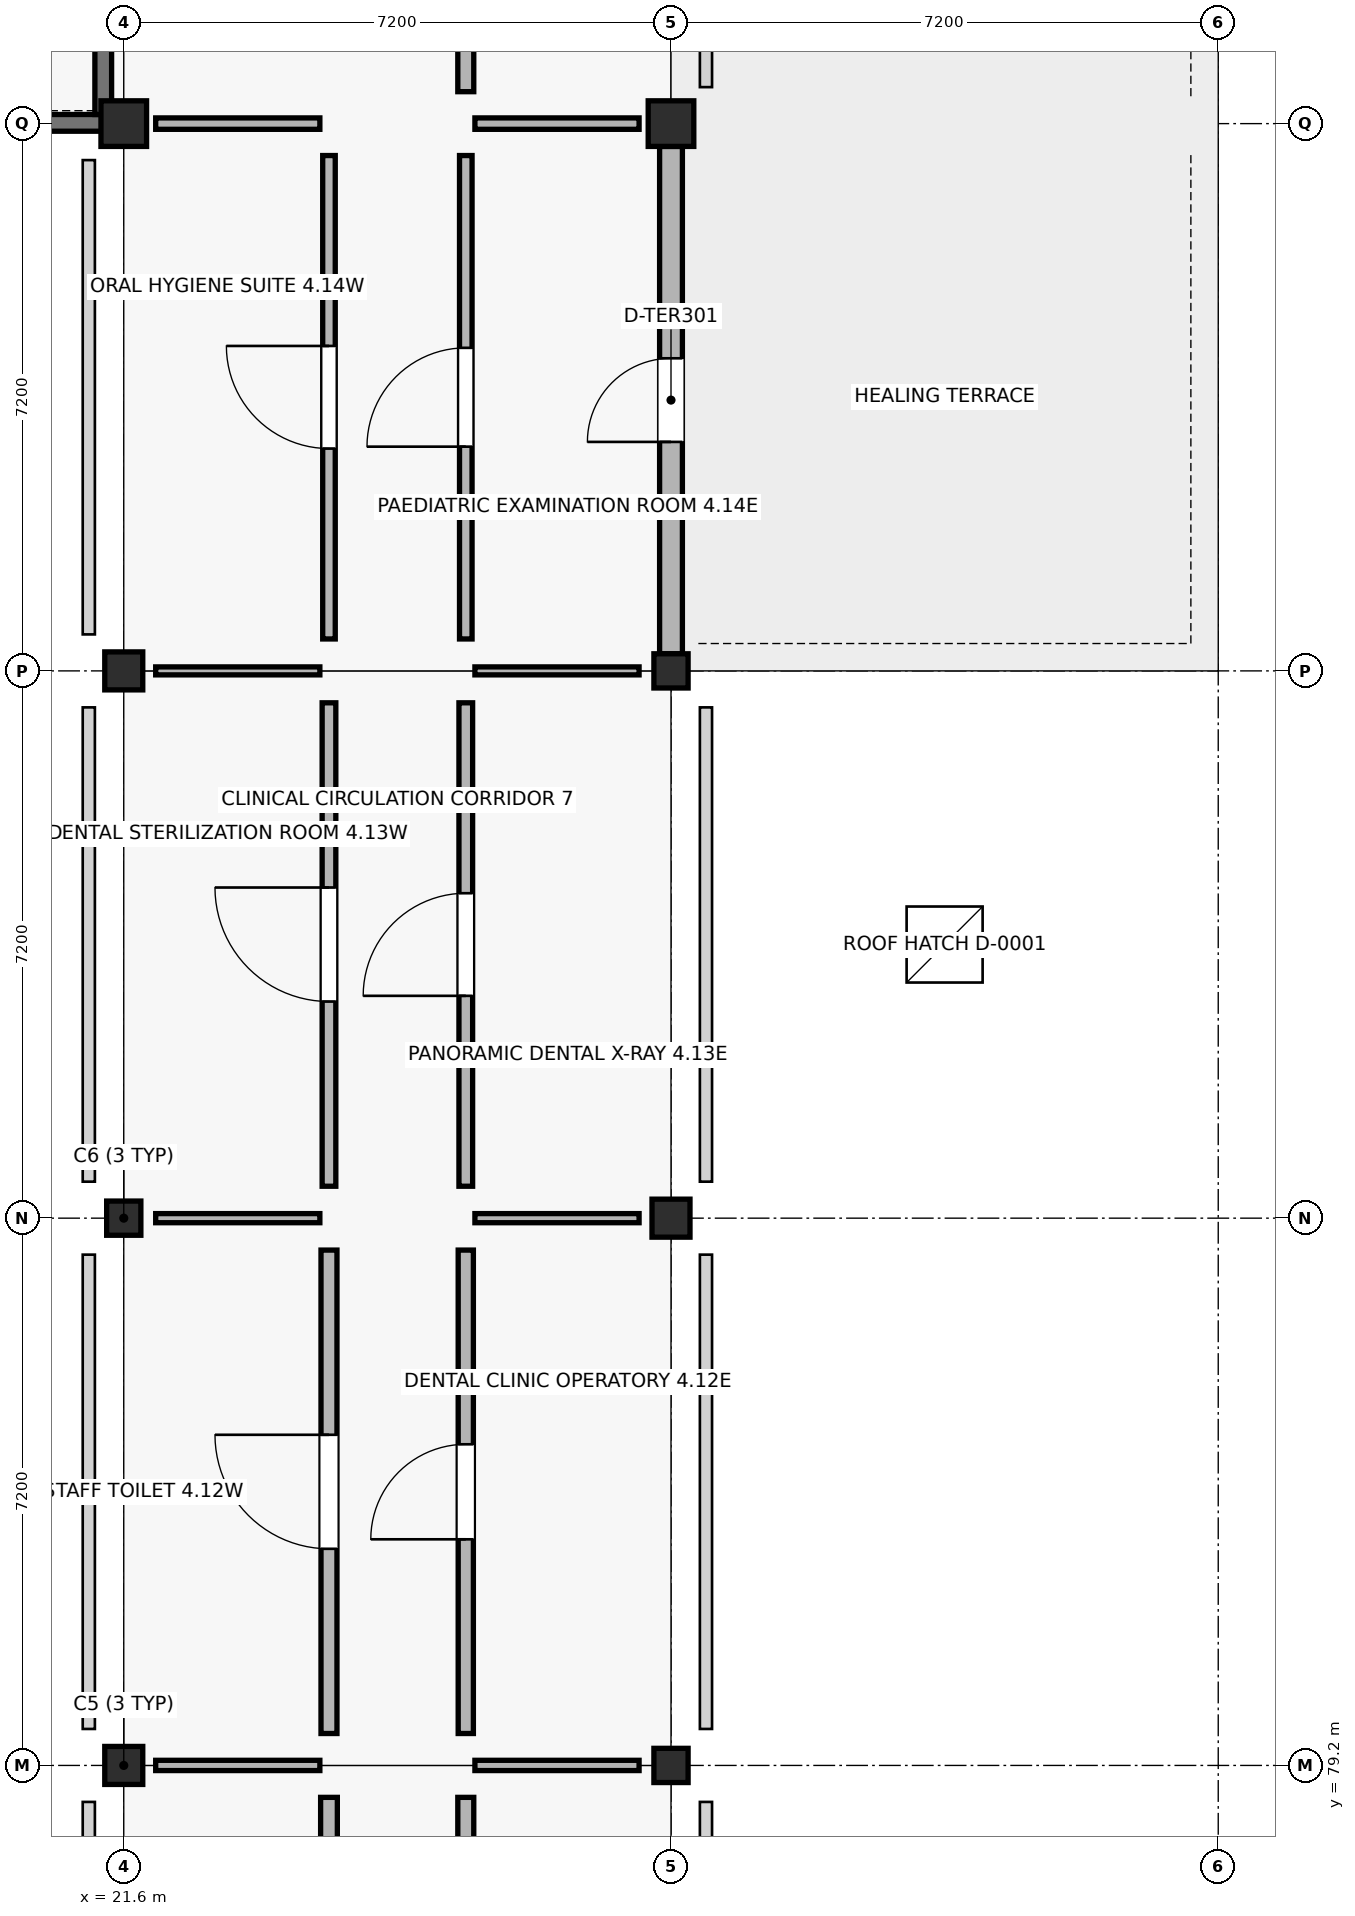
"""IFC4 building model, lengths in metres.
Left out: names, types, materials, properties, quantities, classifications, styles, units other than length and angle.
Written with IfcOpenShell. Run it as: python <this file> out.ifc"""

import sys

from ifc_helpers import new_model, si_unit, direction, frame, frame_2d, origin, origin_2d, place, context, subcontext, project, spatial, rectangle, extrude, element, fill, save


model = new_model("IFC4")
c1 = context("Model", 3, precision=1e-05, world=origin(), true_north=direction((0.0, 1.0)))
c2 = subcontext(c1, "Body", "Model", "MODEL_VIEW")
j1 = project(units=[si_unit("LENGTHUNIT", "METRE"), si_unit("PLANEANGLEUNIT", "RADIAN")], contexts=[c1])
p1 = place(None, origin())
s1 = spatial("IfcSite", under=j1, at=p1, CompositionType="ELEMENT")
p2 = place(p1, origin())
s2 = spatial("IfcBuilding", under=s1, at=p2, CompositionType="ELEMENT")
p3 = place(p2, frame((0.0, 0.0, 13.5)))
s3 = spatial("IfcBuildingStorey", under=s2, at=p3, CompositionType="ELEMENT", Elevation=13.5)
p4 = place(p3, frame((21.6, 79.2, 0.0), z_axis=(0.0, 0.0, 1.0), x_axis=(1.0, 0.0, 0.0)))
e1 = element("IfcColumn", 1, at=p4, inside=s3, PredefinedType="COLUMN", context=c2, shape_type="SweptSolid", body=[
    extrude(rectangle(XDim=0.5, YDim=0.5, at=origin_2d()), origin(), (0.0, 0.0, 1.0), 3.83),
])
p5 = place(p3, frame((21.6, 86.4, 0.0), z_axis=(0.0, 0.0, 1.0), x_axis=(1.0, 0.0, 0.0)))
e2 = element("IfcColumn", 2, at=p5, inside=s3, PredefinedType="COLUMN", context=c2, shape_type="SweptSolid", body=[
    extrude(rectangle(XDim=0.45, YDim=0.45, at=origin_2d()), origin(), (0.0, 0.0, 1.0), 3.83),
])
p6 = place(p3, frame((21.6, 93.6, 0.0), z_axis=(0.0, 0.0, 1.0), x_axis=(1.0, 0.0, 0.0)))
e3 = element("IfcColumn", 3, at=p6, inside=s3, PredefinedType="COLUMN", context=c2, shape_type="SweptSolid", body=[
    extrude(rectangle(XDim=0.5, YDim=0.5, at=origin_2d()), origin(), (0.0, 0.0, 1.0), 3.83),
])
p7 = place(p3, frame((21.6, 100.8, 0.0), z_axis=(0.0, 0.0, 1.0), x_axis=(1.0, 0.0, 0.0)))
e4 = element("IfcColumn", 4, at=p7, inside=s3, PredefinedType="COLUMN", context=c2, shape_type="SweptSolid", body=[
    extrude(rectangle(XDim=0.6, YDim=0.6, at=origin_2d()), origin(), (0.0, 0.0, 1.0), 4.05),
])
p8 = place(p3, frame((28.8, 79.2, 0.0), z_axis=(0.0, 0.0, 1.0), x_axis=(1.0, 0.0, 0.0)))
e5 = element("IfcColumn", 5, at=p8, inside=s3, PredefinedType="COLUMN", context=c2, shape_type="SweptSolid", body=[
    extrude(rectangle(XDim=0.45, YDim=0.45, at=origin_2d()), origin(), (0.0, 0.0, 1.0), 3.83),
])
p9 = place(p3, frame((28.8, 86.4, 0.0), z_axis=(0.0, 0.0, 1.0), x_axis=(1.0, 0.0, 0.0)))
e6 = element("IfcColumn", 6, at=p9, inside=s3, PredefinedType="COLUMN", context=c2, shape_type="SweptSolid", body=[
    extrude(rectangle(XDim=0.5, YDim=0.5, at=origin_2d()), origin(), (0.0, 0.0, 1.0), 3.83),
])
p10 = place(p3, frame((28.8, 93.6, 0.0), z_axis=(0.0, 0.0, 1.0), x_axis=(1.0, 0.0, 0.0)))
e7 = element("IfcColumn", 7, at=p10, inside=s3, PredefinedType="COLUMN", context=c2, shape_type="SweptSolid", body=[
    extrude(rectangle(XDim=0.45, YDim=0.45, at=origin_2d()), origin(), (0.0, 0.0, 1.0), 3.83),
])
p11 = place(p3, frame((28.8, 100.8, 0.0), z_axis=(0.0, 0.0, 1.0), x_axis=(1.0, 0.0, 0.0)))
e8 = element("IfcColumn", 8, at=p11, inside=s3, PredefinedType="COLUMN", context=c2, shape_type="SweptSolid", body=[
    extrude(rectangle(XDim=0.6, YDim=0.6, at=origin_2d()), origin(), (0.0, 0.0, 1.0), 4.05),
])
p12 = place(p3, frame((28.8, 93.825, 0.0), z_axis=(0.0, 0.0, 1.0), x_axis=(0.0, 1.0, 0.0)))
e9 = element("IfcWall", 9, at=p12, inside=s3, PredefinedType="STANDARD", context=c2, shape_type="SweptSolid", body=[
    extrude(rectangle(XDim=6.675, YDim=0.3, at=frame_2d((3.337, 0.0))), origin(), (0.0, 0.0, 1.0), 3.24),
])
p13 = place(p12, frame((2.788, 0.0, 0.0)))
e10 = element("IfcOpeningElement", 10, at=p13, cuts=e9, PredefinedType="OPENING", context=c2, shape_type="SweptSolid", body=[
    extrude(rectangle(XDim=1.1, YDim=2.15, at=frame_2d((0.55, 1.075))), frame((0.0, 0.16, 0.0), z_axis=(0.0, -1.0, 0.0), x_axis=(1.0, 0.0, 0.0)), (0.0, 0.0, 1.0), 0.32),
])
p14 = place(p3, frame((14.56, 100.81, 0.0), z_axis=(0.0, 0.0, 1.0), x_axis=(1.0, 0.0, 0.0)))
e11 = element("IfcWall", 11, at=p14, inside=s3, PredefinedType="SHEAR", context=c2, shape_type="SweptSolid", body=[
    extrude(rectangle(XDim=6.88, YDim=0.22, at=frame_2d((3.44, 0.0))), origin(), (0.0, 0.0, 1.0), 3.79),
])
p15 = place(p3, frame((21.33, 100.92, 0.0), z_axis=(0.0, 0.0, 1.0), x_axis=(0.0, 1.0, 0.0)))
e12 = element("IfcWall", 12, at=p15, inside=s3, PredefinedType="SHEAR", context=c2, shape_type="SweptSolid", body=[
    extrude(rectangle(XDim=3.0, YDim=0.22, at=frame_2d((1.5, 0.0))), origin(), (0.0, 0.0, 1.0), 3.79),
])
p16 = place(p3, frame((24.3, 72.42, 0.0), z_axis=(0.0, 0.0, 1.0), x_axis=(0.0, 1.0, 0.0)))
e13 = element("IfcWall", 13, at=p16, inside=s3, PredefinedType="SOLIDWALL", context=c2, shape_type="SweptSolid", body=[
    extrude(rectangle(XDim=6.36, YDim=0.22, at=frame_2d((3.18, 0.0))), origin(), (0.0, 0.0, 1.0), 2.93),
])
p17 = place(p16, frame((2.47, 0.0, 0.0)))
e14 = element("IfcOpeningElement", 14, at=p17, cuts=e13, PredefinedType="OPENING", context=c2, shape_type="SweptSolid", body=[
    extrude(rectangle(XDim=1.42, YDim=2.19, at=frame_2d((0.71, 1.095))), frame((0.0, 0.12, 0.0), z_axis=(0.0, -1.0, 0.0), x_axis=(1.0, 0.0, 0.0)), (0.0, 0.0, 1.0), 0.24),
])
p18 = place(p3, frame((22.02, 79.2, 0.0), z_axis=(0.0, 0.0, 1.0), x_axis=(1.0, 0.0, 0.0)))
e15 = element("IfcWall", 15, at=p18, inside=s3, PredefinedType="PARTITIONING", context=c2, shape_type="SweptSolid", body=[
    extrude(rectangle(XDim=2.16, YDim=0.135, at=frame_2d((1.08, 0.0))), origin(), (0.0, 0.0, 1.0), 2.93),
])
p19 = place(p3, frame((26.1, 72.42, 0.0), z_axis=(0.0, 0.0, 1.0), x_axis=(0.0, 1.0, 0.0)))
e16 = element("IfcWall", 16, at=p19, inside=s3, PredefinedType="PLUMBINGWALL", context=c2, shape_type="SweptSolid", body=[
    extrude(rectangle(XDim=6.36, YDim=0.21, at=frame_2d((3.18, 0.0))), origin(), (0.0, 0.0, 1.0), 2.93),
])
p20 = place(p19, frame((2.45, 0.0, 0.0)))
e17 = element("IfcOpeningElement", 17, at=p20, cuts=e16, PredefinedType="OPENING", context=c2, shape_type="SweptSolid", body=[
    extrude(rectangle(XDim=1.46, YDim=2.19, at=frame_2d((0.73, 1.095))), frame((0.0, 0.115, 0.0), z_axis=(0.0, -1.0, 0.0), x_axis=(1.0, 0.0, 0.0)), (0.0, 0.0, 1.0), 0.23),
])
p21 = place(p3, frame((26.22, 79.2, 0.0), z_axis=(0.0, 0.0, 1.0), x_axis=(1.0, 0.0, 0.0)))
e18 = element("IfcWall", 18, at=p21, inside=s3, PredefinedType="PARTITIONING", context=c2, shape_type="SweptSolid", body=[
    extrude(rectangle(XDim=2.16, YDim=0.135, at=frame_2d((1.08, 0.0))), origin(), (0.0, 0.0, 1.0), 2.93),
])
p22 = place(p3, frame((24.3, 79.62, 0.0), z_axis=(0.0, 0.0, 1.0), x_axis=(0.0, 1.0, 0.0)))
e19 = element("IfcWall", 19, at=p22, inside=s3, PredefinedType="PLUMBINGWALL", context=c2, shape_type="SweptSolid", body=[
    extrude(rectangle(XDim=6.36, YDim=0.21, at=frame_2d((3.18, 0.0))), origin(), (0.0, 0.0, 1.0), 2.93),
])
p23 = place(p22, frame((2.43, 0.0, 0.0)))
e20 = element("IfcOpeningElement", 20, at=p23, cuts=e19, PredefinedType="OPENING", context=c2, shape_type="SweptSolid", body=[
    extrude(rectangle(XDim=1.5, YDim=2.19, at=frame_2d((0.75, 1.095))), frame((0.0, 0.115, 0.0), z_axis=(0.0, -1.0, 0.0), x_axis=(1.0, 0.0, 0.0)), (0.0, 0.0, 1.0), 0.23),
])
p24 = place(p3, frame((22.02, 86.4, 0.0), z_axis=(0.0, 0.0, 1.0), x_axis=(1.0, 0.0, 0.0)))
e21 = element("IfcWall", 21, at=p24, inside=s3, PredefinedType="PARTITIONING", context=c2, shape_type="SweptSolid", body=[
    extrude(rectangle(XDim=2.16, YDim=0.12, at=frame_2d((1.08, 0.0))), origin(), (0.0, 0.0, 1.0), 2.93),
])
p25 = place(p3, frame((26.1, 79.62, 0.0), z_axis=(0.0, 0.0, 1.0), x_axis=(0.0, 1.0, 0.0)))
e22 = element("IfcWall", 22, at=p25, inside=s3, PredefinedType="SOLIDWALL", context=c2, shape_type="SweptSolid", body=[
    extrude(rectangle(XDim=6.36, YDim=0.2, at=frame_2d((3.18, 0.0))), origin(), (0.0, 0.0, 1.0), 2.93),
])
p26 = place(p25, frame((2.555, 0.0, 0.0)))
e23 = element("IfcOpeningElement", 23, at=p26, cuts=e22, PredefinedType="OPENING", context=c2, shape_type="SweptSolid", body=[
    extrude(rectangle(XDim=1.25, YDim=2.15, at=frame_2d((0.625, 1.075))), frame((0.0, 0.11, 0.0), z_axis=(0.0, -1.0, 0.0), x_axis=(1.0, 0.0, 0.0)), (0.0, 0.0, 1.0), 0.22),
])
p27 = place(p3, frame((26.22, 86.4, 0.0), z_axis=(0.0, 0.0, 1.0), x_axis=(1.0, 0.0, 0.0)))
e24 = element("IfcWall", 24, at=p27, inside=s3, PredefinedType="PARTITIONING", context=c2, shape_type="SweptSolid", body=[
    extrude(rectangle(XDim=2.16, YDim=0.12, at=frame_2d((1.08, 0.0))), origin(), (0.0, 0.0, 1.0), 2.93),
])
p28 = place(p3, frame((24.3, 86.82, 0.0), z_axis=(0.0, 0.0, 1.0), x_axis=(0.0, 1.0, 0.0)))
e25 = element("IfcWall", 25, at=p28, inside=s3, PredefinedType="PARTITIONING", context=c2, shape_type="SweptSolid", body=[
    extrude(rectangle(XDim=6.36, YDim=0.18, at=frame_2d((3.18, 0.0))), origin(), (0.0, 0.0, 1.0), 2.93),
])
p29 = place(p28, frame((2.43, 0.0, 0.0)))
e26 = element("IfcOpeningElement", 26, at=p29, cuts=e25, PredefinedType="OPENING", context=c2, shape_type="SweptSolid", body=[
    extrude(rectangle(XDim=1.5, YDim=2.2, at=frame_2d((0.75, 1.1))), frame((0.0, 0.1, 0.0), z_axis=(0.0, -1.0, 0.0), x_axis=(1.0, 0.0, 0.0)), (0.0, 0.0, 1.0), 0.2),
])
p30 = place(p3, frame((22.02, 93.6, 0.0), z_axis=(0.0, 0.0, 1.0), x_axis=(1.0, 0.0, 0.0)))
e27 = element("IfcWall", 27, at=p30, inside=s3, PredefinedType="PARTITIONING", context=c2, shape_type="SweptSolid", body=[
    extrude(rectangle(XDim=2.16, YDim=0.105, at=frame_2d((1.08, 0.0))), origin(), (0.0, 0.0, 1.0), 2.93),
])
p31 = place(p3, frame((26.1, 86.82, 0.0), z_axis=(0.0, 0.0, 1.0), x_axis=(0.0, 1.0, 0.0)))
e28 = element("IfcWall", 28, at=p31, inside=s3, PredefinedType="PARTITIONING", context=c2, shape_type="SweptSolid", body=[
    extrude(rectangle(XDim=6.36, YDim=0.18, at=frame_2d((3.18, 0.0))), origin(), (0.0, 0.0, 1.0), 2.93),
])
p32 = place(p31, frame((2.505, 0.0, 0.0)))
e29 = element("IfcOpeningElement", 29, at=p32, cuts=e28, PredefinedType="OPENING", context=c2, shape_type="SweptSolid", body=[
    extrude(rectangle(XDim=1.35, YDim=2.2, at=frame_2d((0.675, 1.1))), frame((0.0, 0.1, 0.0), z_axis=(0.0, -1.0, 0.0), x_axis=(1.0, 0.0, 0.0)), (0.0, 0.0, 1.0), 0.2),
])
p33 = place(p3, frame((26.22, 93.6, 0.0), z_axis=(0.0, 0.0, 1.0), x_axis=(1.0, 0.0, 0.0)))
e30 = element("IfcWall", 30, at=p33, inside=s3, PredefinedType="PARTITIONING", context=c2, shape_type="SweptSolid", body=[
    extrude(rectangle(XDim=2.16, YDim=0.105, at=frame_2d((1.08, 0.0))), origin(), (0.0, 0.0, 1.0), 2.93),
])
p34 = place(p3, frame((24.3, 94.02, 0.0), z_axis=(0.0, 0.0, 1.0), x_axis=(0.0, 1.0, 0.0)))
e31 = element("IfcWall", 31, at=p34, inside=s3, PredefinedType="PARTITIONING", context=c2, shape_type="SweptSolid", body=[
    extrude(rectangle(XDim=6.36, YDim=0.165, at=frame_2d((3.18, 0.0))), origin(), (0.0, 0.0, 1.0), 2.93),
])
p35 = place(p34, frame((2.505, 0.0, 0.0)))
e32 = element("IfcOpeningElement", 32, at=p35, cuts=e31, PredefinedType="OPENING", context=c2, shape_type="SweptSolid", body=[
    extrude(rectangle(XDim=1.35, YDim=2.2, at=frame_2d((0.675, 1.1))), frame((0.0, 0.093, 0.0), z_axis=(0.0, -1.0, 0.0), x_axis=(1.0, 0.0, 0.0)), (0.0, 0.0, 1.0), 0.185),
])
p36 = place(p3, frame((22.02, 100.8, 0.0), z_axis=(0.0, 0.0, 1.0), x_axis=(1.0, 0.0, 0.0)))
e33 = element("IfcWall", 33, at=p36, inside=s3, PredefinedType="PARTITIONING", context=c2, shape_type="SweptSolid", body=[
    extrude(rectangle(XDim=2.16, YDim=0.15, at=frame_2d((1.08, 0.0))), origin(), (0.0, 0.0, 1.0), 2.93),
])
p37 = place(p3, frame((26.1, 94.02, 0.0), z_axis=(0.0, 0.0, 1.0), x_axis=(0.0, 1.0, 0.0)))
e34 = element("IfcWall", 34, at=p37, inside=s3, PredefinedType="PARTITIONING", context=c2, shape_type="SweptSolid", body=[
    extrude(rectangle(XDim=6.36, YDim=0.165, at=frame_2d((3.18, 0.0))), origin(), (0.0, 0.0, 1.0), 2.93),
])
p38 = place(p37, frame((2.53, 0.0, 0.0)))
e35 = element("IfcOpeningElement", 35, at=p38, cuts=e34, PredefinedType="OPENING", context=c2, shape_type="SweptSolid", body=[
    extrude(rectangle(XDim=1.3, YDim=2.15, at=frame_2d((0.65, 1.075))), frame((0.0, 0.093, 0.0), z_axis=(0.0, -1.0, 0.0), x_axis=(1.0, 0.0, 0.0)), (0.0, 0.0, 1.0), 0.185),
])
p39 = place(p3, frame((26.22, 100.8, 0.0), z_axis=(0.0, 0.0, 1.0), x_axis=(1.0, 0.0, 0.0)))
e36 = element("IfcWall", 36, at=p39, inside=s3, PredefinedType="PARTITIONING", context=c2, shape_type="SweptSolid", body=[
    extrude(rectangle(XDim=2.16, YDim=0.15, at=frame_2d((1.08, 0.0))), origin(), (0.0, 0.0, 1.0), 2.93),
])
p40 = place(p3, frame((26.1, 101.22, 0.0), z_axis=(0.0, 0.0, 1.0), x_axis=(0.0, 1.0, 0.0)))
e37 = element("IfcWall", 37, at=p40, inside=s3, PredefinedType="PLUMBINGWALL", context=c2, shape_type="SweptSolid", body=[
    extrude(rectangle(XDim=6.36, YDim=0.21, at=frame_2d((3.18, 0.0))), origin(), (0.0, 0.0, 1.0), 2.93),
])
p41 = place(p40, frame((2.73, 0.0, 0.0)))
e38 = element("IfcOpeningElement", 38, at=p41, cuts=e37, PredefinedType="OPENING", context=c2, shape_type="SweptSolid", body=[
    extrude(rectangle(XDim=0.9, YDim=2.04, at=frame_2d((0.45, 1.02))), frame((0.0, 0.115, 0.0), z_axis=(0.0, -1.0, 0.0), x_axis=(1.0, 0.0, 0.0)), (0.0, 0.0, 1.0), 0.23),
])
p42 = place(p13, origin())
e39 = element("IfcDoor", 39, at=p42, inside=s3, OperationType="SINGLE_SWING_LEFT", PredefinedType="DOOR", context=c2, shape_type="SweptSolid", body=[
    extrude(rectangle(XDim=1.1, YDim=2.15, at=frame_2d((0.55, 1.075))), frame((0.0, 0.025, 0.0), z_axis=(0.0, -1.0, 0.0), x_axis=(1.0, 0.0, 0.0)), (0.0, 0.0, 1.0), 0.05),
])
fill(e10, e39)
p43 = place(p3, frame((0.0, 0.0, -0.24)))
p44 = place(p43, frame((32.4, 90.0, 0.19)))
e40 = element("IfcDoor", 40, at=p44, inside=s3, OperationType="SINGLE_SWING_LEFT", PredefinedType="TRAPDOOR", context=c2, shape_type="SweptSolid", body=[
    extrude(rectangle(XDim=1.0, YDim=1.0, at=origin_2d()), origin(), (0.0, 0.0, 1.0), 0.05),
])
p45 = place(p23, origin())
e41 = element("IfcDoor", 41, at=p45, inside=s3, OperationType="SINGLE_SWING_RIGHT", PredefinedType="DOOR", context=c2, shape_type="SweptSolid", body=[
    extrude(rectangle(XDim=1.5, YDim=2.19, at=frame_2d((0.75, 1.095))), frame((0.0, 0.025, 0.0), z_axis=(0.0, -1.0, 0.0), x_axis=(1.0, 0.0, 0.0)), (0.0, 0.0, 1.0), 0.05),
])
fill(e20, e41)
p46 = place(p26, origin())
e42 = element("IfcDoor", 42, at=p46, inside=s3, OperationType="SINGLE_SWING_LEFT", PredefinedType="DOOR", context=c2, shape_type="SweptSolid", body=[
    extrude(rectangle(XDim=1.25, YDim=2.15, at=frame_2d((0.625, 1.075))), frame((0.0, 0.025, 0.0), z_axis=(0.0, -1.0, 0.0), x_axis=(1.0, 0.0, 0.0)), (0.0, 0.0, 1.0), 0.05),
])
fill(e23, e42)
p47 = place(p29, origin())
e43 = element("IfcDoor", 43, at=p47, inside=s3, OperationType="SINGLE_SWING_RIGHT", PredefinedType="DOOR", context=c2, shape_type="SweptSolid", body=[
    extrude(rectangle(XDim=1.5, YDim=2.2, at=frame_2d((0.75, 1.1))), frame((0.0, 0.025, 0.0), z_axis=(0.0, -1.0, 0.0), x_axis=(1.0, 0.0, 0.0)), (0.0, 0.0, 1.0), 0.05),
])
fill(e26, e43)
p48 = place(p32, origin())
e44 = element("IfcDoor", 44, at=p48, inside=s3, OperationType="SINGLE_SWING_LEFT", PredefinedType="DOOR", context=c2, shape_type="SweptSolid", body=[
    extrude(rectangle(XDim=1.35, YDim=2.2, at=frame_2d((0.675, 1.1))), frame((0.0, 0.025, 0.0), z_axis=(0.0, -1.0, 0.0), x_axis=(1.0, 0.0, 0.0)), (0.0, 0.0, 1.0), 0.05),
])
fill(e29, e44)
p49 = place(p35, origin())
e45 = element("IfcDoor", 45, at=p49, inside=s3, OperationType="SINGLE_SWING_RIGHT", PredefinedType="DOOR", context=c2, shape_type="SweptSolid", body=[
    extrude(rectangle(XDim=1.35, YDim=2.2, at=frame_2d((0.675, 1.1))), frame((0.0, 0.025, 0.0), z_axis=(0.0, -1.0, 0.0), x_axis=(1.0, 0.0, 0.0)), (0.0, 0.0, 1.0), 0.05),
])
fill(e32, e45)
p50 = place(p38, origin())
e46 = element("IfcDoor", 46, at=p50, inside=s3, OperationType="SINGLE_SWING_LEFT", PredefinedType="DOOR", context=c2, shape_type="SweptSolid", body=[
    extrude(rectangle(XDim=1.3, YDim=2.15, at=frame_2d((0.65, 1.075))), frame((0.0, 0.025, 0.0), z_axis=(0.0, -1.0, 0.0), x_axis=(1.0, 0.0, 0.0)), (0.0, 0.0, 1.0), 0.05),
])
fill(e35, e46)
save(model, sys.argv[1])
